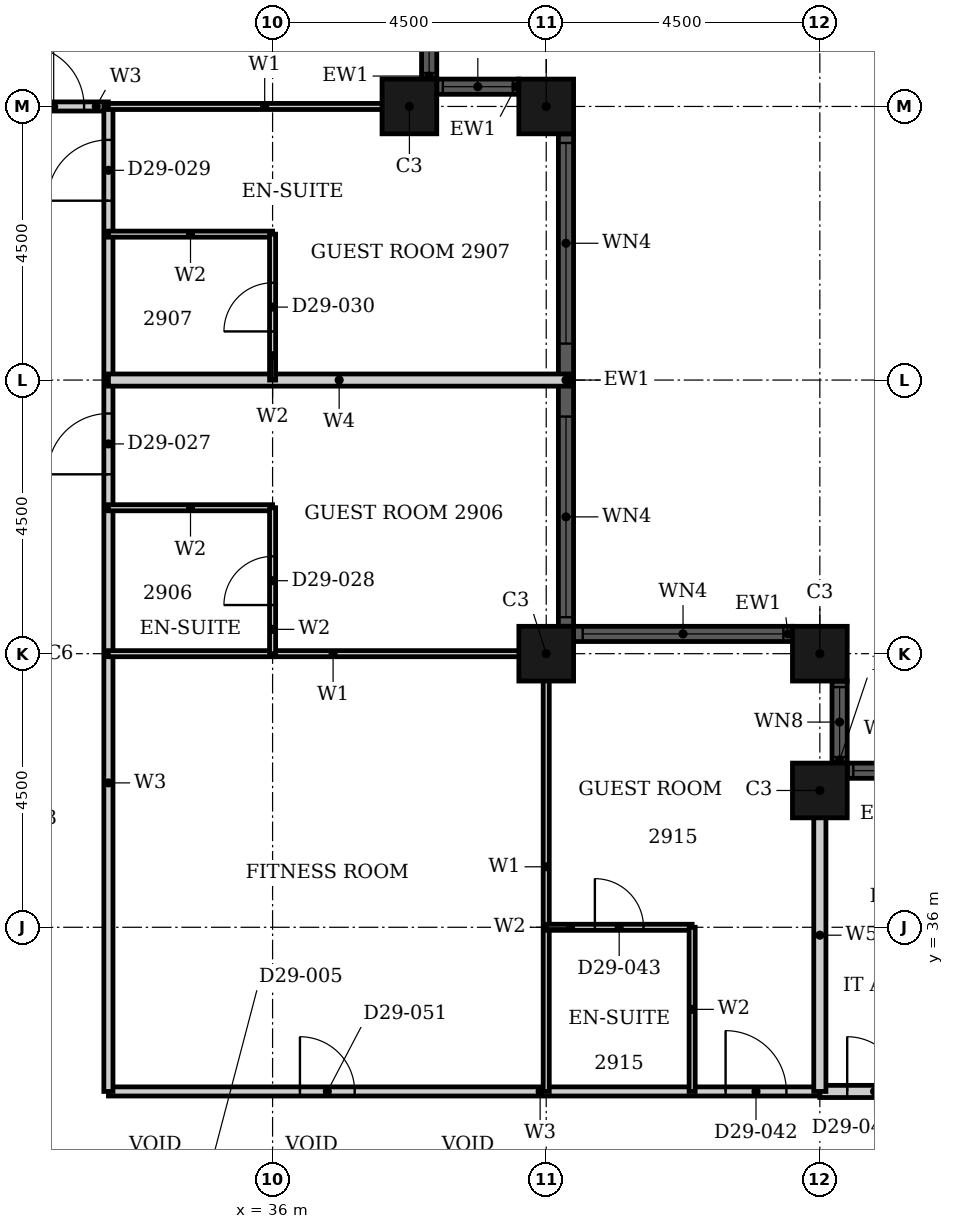
"""IFC4 building model, lengths in metres.
Left out: names, types, materials, properties, quantities, classifications, styles, units other than length and angle.
Written with IfcOpenShell. Run it as: python <this file> out.ifc"""

import sys

from ifc_helpers import new_model, si_unit, direction, frame, frame_2d, origin, origin_2d, place, context, subcontext, project, spatial, rectangle, hollow_rectangle, extrude, element, fill, save


model = new_model("IFC4")
c1 = context("Model", 3, precision=1e-05, world=origin(), true_north=direction((0.0, 1.0)))
c2 = subcontext(c1, "Body", "Model", "MODEL_VIEW")
j1 = project(units=[si_unit("LENGTHUNIT", "METRE"), si_unit("PLANEANGLEUNIT", "RADIAN")], contexts=[c1])
p1 = place(None, origin())
s1 = spatial("IfcSite", under=j1, at=p1, CompositionType="ELEMENT")
p2 = place(p1, origin())
s2 = spatial("IfcBuilding", under=s1, at=p2, CompositionType="ELEMENT")
p3 = place(p2, frame((0.0, 0.0, 118.8)))
s3 = spatial("IfcBuildingStorey", under=s2, at=p3, CompositionType="ELEMENT", Elevation=118.8)
for number, where, z_axis, x_axis in (
    (1, (45.0, 38.25, 0.0), (0.0, 0.0, 1.0), (1.0, 0.0, 0.0)),
    (2, (45.0, 40.5, 0.0), (0.0, 0.0, 1.0), (1.0, 0.0, 0.0)),
    (3, (40.5, 40.5, 0.0), (0.0, 0.0, 1.0), (1.0, 0.0, 0.0)),
    (4, (40.5, 49.5, 0.0), (0.0, 0.0, 1.0), (1.0, 0.0, 0.0)),
    (5, (38.25, 49.5, 0.0), (0.0, 0.0, 1.0), (1.0, 0.0, 0.0)),
):
    element("IfcColumn", number, at=place(p3, frame(where, z_axis=z_axis, x_axis=x_axis)), inside=s3, PredefinedType="COLUMN", context=c2, shape_type="SweptSolid", body=[
        extrude(hollow_rectangle(XDim=0.9, YDim=0.9, WallThickness=0.028, at=origin_2d()), origin(), (0.0, 0.0, 1.0), 3.6),
    ])
p4 = place(p3, frame((46.8, 38.575, 0.0), z_axis=(0.0, 0.0, 1.0), x_axis=(-1.0, 0.0, 0.0)))
e6 = element("IfcWall", 6, at=p4, inside=s3, PredefinedType="SOLIDWALL", context=c2, shape_type="SweptSolid", body=[
    extrude(rectangle(XDim=1.35, YDim=0.25, at=frame_2d((0.675, 0.0))), origin(), (0.0, 0.0, 1.0), 3.6),
])
p5 = place(p4, frame((0.1, 0.0, 0.9)))
e7 = element("IfcOpeningElement", 7, at=p5, cuts=e6, PredefinedType="OPENING", context=c2, shape_type="SweptSolid", body=[
    extrude(rectangle(XDim=1.15, YDim=2.08, at=frame_2d((0.575, 1.04))), frame((0.0, 0.135, 0.0), z_axis=(0.0, -1.0, 0.0), x_axis=(1.0, 0.0, 0.0)), (0.0, 0.0, 1.0), 0.27),
])
p6 = place(p3, frame((45.325, 38.7, 0.0), z_axis=(0.0, 0.0, 1.0), x_axis=(0.0, 1.0, 0.0)))
e8 = element("IfcWall", 8, at=p6, inside=s3, PredefinedType="SOLIDWALL", context=c2, shape_type="SweptSolid", body=[
    extrude(rectangle(XDim=1.35, YDim=0.25, at=frame_2d((0.675, 0.0))), origin(), (0.0, 0.0, 1.0), 3.6),
])
p7 = place(p6, frame((0.1, 0.0, 0.9)))
e9 = element("IfcOpeningElement", 9, at=p7, cuts=e8, PredefinedType="OPENING", context=c2, shape_type="SweptSolid", body=[
    extrude(rectangle(XDim=1.15, YDim=2.08, at=frame_2d((0.575, 1.04))), frame((0.0, 0.135, 0.0), z_axis=(0.0, -1.0, 0.0), x_axis=(1.0, 0.0, 0.0)), (0.0, 0.0, 1.0), 0.27),
])
p8 = place(p3, frame((44.55, 40.825, 0.0), z_axis=(0.0, 0.0, 1.0), x_axis=(-1.0, 0.0, 0.0)))
e10 = element("IfcWall", 10, at=p8, inside=s3, PredefinedType="SOLIDWALL", context=c2, shape_type="SweptSolid", body=[
    extrude(rectangle(XDim=3.6, YDim=0.25, at=frame_2d((1.8, 0.0))), origin(), (0.0, 0.0, 1.0), 3.6),
])
p9 = place(p8, frame((0.15, 0.0, 0.9)))
e11 = element("IfcOpeningElement", 11, at=p9, cuts=e10, PredefinedType="OPENING", context=c2, shape_type="SweptSolid", body=[
    extrude(rectangle(XDim=3.3, YDim=2.08, at=frame_2d((1.65, 1.04))), frame((0.0, 0.135, 0.0), z_axis=(0.0, -1.0, 0.0), x_axis=(1.0, 0.0, 0.0)), (0.0, 0.0, 1.0), 0.27),
])
p10 = place(p3, frame((40.825, 40.95, 0.0), z_axis=(0.0, 0.0, 1.0), x_axis=(0.0, 1.0, 0.0)))
e12 = element("IfcWall", 12, at=p10, inside=s3, PredefinedType="SOLIDWALL", context=c2, shape_type="SweptSolid", body=[
    extrude(rectangle(XDim=8.1, YDim=0.25, at=frame_2d((4.05, 0.0))), origin(), (0.0, 0.0, 1.0), 3.6),
])
p11 = place(p10, frame((0.15, 0.0, 0.9)))
e13 = element("IfcOpeningElement", 13, at=p11, cuts=e12, PredefinedType="OPENING", context=c2, shape_type="SweptSolid", body=[
    extrude(rectangle(XDim=3.3, YDim=2.08, at=frame_2d((1.65, 1.04))), frame((0.0, 0.135, 0.0), z_axis=(0.0, -1.0, 0.0), x_axis=(1.0, 0.0, 0.0)), (0.0, 0.0, 1.0), 0.27),
])
p12 = place(p10, frame((4.65, 0.0, 0.9)))
e14 = element("IfcOpeningElement", 14, at=p12, cuts=e12, PredefinedType="OPENING", context=c2, shape_type="SweptSolid", body=[
    extrude(rectangle(XDim=3.3, YDim=2.08, at=frame_2d((1.65, 1.04))), frame((0.0, 0.135, 0.0), z_axis=(0.0, -1.0, 0.0), x_axis=(1.0, 0.0, 0.0)), (0.0, 0.0, 1.0), 0.27),
])
p13 = place(p3, frame((40.05, 49.825, 0.0), z_axis=(0.0, 0.0, 1.0), x_axis=(-1.0, 0.0, 0.0)))
e15 = element("IfcWall", 15, at=p13, inside=s3, PredefinedType="SOLIDWALL", context=c2, shape_type="SweptSolid", body=[
    extrude(rectangle(XDim=1.35, YDim=0.25, at=frame_2d((0.675, 0.0))), origin(), (0.0, 0.0, 1.0), 3.6),
])
p14 = place(p13, frame((0.1, 0.0, 0.9)))
e16 = element("IfcOpeningElement", 16, at=p14, cuts=e15, PredefinedType="OPENING", context=c2, shape_type="SweptSolid", body=[
    extrude(rectangle(XDim=1.15, YDim=2.08, at=frame_2d((0.575, 1.04))), frame((0.0, 0.135, 0.0), z_axis=(0.0, -1.0, 0.0), x_axis=(1.0, 0.0, 0.0)), (0.0, 0.0, 1.0), 0.27),
])
p15 = place(p3, frame((38.575, 49.95, 0.0), z_axis=(0.0, 0.0, 1.0), x_axis=(0.0, 1.0, 0.0)))
e17 = element("IfcWall", 17, at=p15, inside=s3, PredefinedType="SOLIDWALL", context=c2, shape_type="SweptSolid", body=[
    extrude(rectangle(XDim=1.35, YDim=0.25, at=frame_2d((0.675, 0.0))), origin(), (0.0, 0.0, 1.0), 3.6),
])
p16 = place(p15, frame((0.1, 0.0, 0.9)))
e18 = element("IfcOpeningElement", 18, at=p16, cuts=e17, PredefinedType="OPENING", context=c2, shape_type="SweptSolid", body=[
    extrude(rectangle(XDim=1.15, YDim=2.08, at=frame_2d((0.575, 1.04))), frame((0.0, 0.135, 0.0), z_axis=(0.0, -1.0, 0.0), x_axis=(1.0, 0.0, 0.0)), (0.0, 0.0, 1.0), 0.27),
])
p17 = place(p3, frame((33.3, 33.3, 0.0), z_axis=(0.0, 0.0, 1.0), x_axis=(1.0, 0.0, 0.0)))
e19 = element("IfcWall", 19, at=p17, inside=s3, PredefinedType="PARTITIONING", context=c2, shape_type="SweptSolid", body=[
    extrude(rectangle(XDim=11.7, YDim=0.15, at=frame_2d((5.85, 0.0))), origin(), (0.0, 0.0, 1.0), 3.3),
])
p18 = place(p17, frame((10.15, 0.0, 0.0)))
e20 = element("IfcOpeningElement", 20, at=p18, cuts=e19, PredefinedType="OPENING", context=c2, shape_type="SweptSolid", body=[
    extrude(rectangle(XDim=1.0, YDim=2.1, at=frame_2d((0.5, 1.05))), frame((0.0, 0.085, 0.0), z_axis=(0.0, -1.0, 0.0), x_axis=(1.0, 0.0, 0.0)), (0.0, 0.0, 1.0), 0.17),
])
p19 = place(p17, frame((3.15, 0.0, 0.0)))
e21 = element("IfcOpeningElement", 21, at=p19, cuts=e19, PredefinedType="OPENING", context=c2, shape_type="SweptSolid", body=[
    extrude(rectangle(XDim=0.9, YDim=2.1, at=frame_2d((0.45, 1.05))), frame((0.0, 0.085, 0.0), z_axis=(0.0, -1.0, 0.0), x_axis=(1.0, 0.0, 0.0)), (0.0, 0.0, 1.0), 0.17),
])
p20 = place(p3, frame((31.5, 49.5, 0.0), z_axis=(0.0, 0.0, 1.0), x_axis=(1.0, 0.0, 0.0)))
e22 = element("IfcWall", 22, at=p20, inside=s3, PredefinedType="PARTITIONING", context=c2, shape_type="SweptSolid", body=[
    extrude(rectangle(XDim=1.8, YDim=0.15, at=frame_2d((0.9, 0.0))), origin(), (0.0, 0.0, 1.0), 3.3),
])
p21 = place(p20, frame((0.4, 0.0, 0.0)))
e23 = element("IfcOpeningElement", 23, at=p21, cuts=e22, PredefinedType="OPENING", context=c2, shape_type="SweptSolid", body=[
    extrude(rectangle(XDim=1.0, YDim=2.1, at=frame_2d((0.5, 1.05))), frame((0.0, 0.085, 0.0), z_axis=(0.0, -1.0, 0.0), x_axis=(1.0, 0.0, 0.0)), (0.0, 0.0, 1.0), 0.17),
])
p22 = place(p3, frame((33.3, 33.3, 0.0), z_axis=(0.0, 0.0, 1.0), x_axis=(0.0, 1.0, 0.0)))
e24 = element("IfcWall", 24, at=p22, inside=s3, PredefinedType="PARTITIONING", context=c2, shape_type="SweptSolid", body=[
    extrude(rectangle(XDim=16.2, YDim=0.15, at=frame_2d((8.1, 0.0))), origin(), (0.0, 0.0, 1.0), 3.3),
])
p23 = place(p22, frame((10.15, 0.0, 0.0)))
e25 = element("IfcOpeningElement", 25, at=p23, cuts=e24, PredefinedType="OPENING", context=c2, shape_type="SweptSolid", body=[
    extrude(rectangle(XDim=1.0, YDim=2.1, at=frame_2d((0.5, 1.05))), frame((0.0, 0.085, 0.0), z_axis=(0.0, -1.0, 0.0), x_axis=(1.0, 0.0, 0.0)), (0.0, 0.0, 1.0), 0.17),
])
p24 = place(p22, frame((14.65, 0.0, 0.0)))
e26 = element("IfcOpeningElement", 26, at=p24, cuts=e24, PredefinedType="OPENING", context=c2, shape_type="SweptSolid", body=[
    extrude(rectangle(XDim=1.0, YDim=2.1, at=frame_2d((0.5, 1.05))), frame((0.0, 0.085, 0.0), z_axis=(0.0, -1.0, 0.0), x_axis=(1.0, 0.0, 0.0)), (0.0, 0.0, 1.0), 0.17),
])
p25 = place(p3, frame((33.3, 40.5, 0.0), z_axis=(0.0, 0.0, 1.0), x_axis=(1.0, 0.0, 0.0)))
e27 = element("IfcWall", 27, at=p25, inside=s3, PredefinedType="PARTITIONING", context=c2, shape_type="SweptSolid", body=[
    extrude(rectangle(XDim=7.39, YDim=0.1, at=frame_2d((3.695, 0.0))), origin(), (0.0, 0.0, 1.0), 2.38),
])
p26 = place(p3, frame((33.3, 49.5, 0.0), z_axis=(0.0, 0.0, 1.0), x_axis=(1.0, 0.0, 0.0)))
e28 = element("IfcWall", 28, at=p26, inside=s3, PredefinedType="PARTITIONING", context=c2, shape_type="SweptSolid", body=[
    extrude(rectangle(XDim=5.14, YDim=0.1, at=frame_2d((2.57, 0.0))), origin(), (0.0, 0.0, 1.0), 3.3),
])
p27 = place(p3, frame((40.5, 33.3, 0.0), z_axis=(0.0, 0.0, 1.0), x_axis=(0.0, 1.0, 0.0)))
e29 = element("IfcWall", 29, at=p27, inside=s3, PredefinedType="PARTITIONING", context=c2, shape_type="SweptSolid", body=[
    extrude(rectangle(XDim=7.39, YDim=0.1, at=frame_2d((3.695, 0.0))), origin(), (0.0, 0.0, 1.0), 3.3),
])
p28 = place(p3, frame((33.3, 45.0, 0.0), z_axis=(0.0, 0.0, 1.0), x_axis=(1.0, 0.0, 0.0)))
e30 = element("IfcWall", 30, at=p28, inside=s3, PredefinedType="PARTITIONING", context=c2, shape_type="SweptSolid", body=[
    extrude(rectangle(XDim=7.59, YDim=0.2, at=frame_2d((3.795, 0.0))), origin(), (0.0, 0.0, 1.0), 3.3),
])
p29 = place(p3, frame((40.5, 36.0, 0.0), z_axis=(0.0, 0.0, 1.0), x_axis=(1.0, 0.0, 0.0)))
e31 = element("IfcWall", 31, at=p29, inside=s3, PredefinedType="PARTITIONING", context=c2, shape_type="SweptSolid", body=[
    extrude(rectangle(XDim=2.4, YDim=0.1, at=frame_2d((1.2, 0.0))), origin(), (0.0, 0.0, 1.0), 3.3),
])
p30 = place(p29, frame((0.8, 0.0, 0.0)))
e32 = element("IfcOpeningElement", 32, at=p30, cuts=e31, PredefinedType="OPENING", context=c2, shape_type="SweptSolid", body=[
    extrude(rectangle(XDim=0.8, YDim=2.1, at=frame_2d((0.4, 1.05))), frame((0.0, 0.06, 0.0), z_axis=(0.0, -1.0, 0.0), x_axis=(1.0, 0.0, 0.0)), (0.0, 0.0, 1.0), 0.12),
])
for number, where, z_axis, x_axis in (
    (33, (33.3, 42.9, 0.0), (0.0, 0.0, 1.0), (1.0, 0.0, 0.0)),
    (34, (33.3, 47.4, 0.0), (0.0, 0.0, 1.0), (1.0, 0.0, 0.0)),
):
    element("IfcWall", number, at=place(p3, frame(where, z_axis=z_axis, x_axis=x_axis)), inside=s3, PredefinedType="PARTITIONING", context=c2, shape_type="SweptSolid", body=[
        extrude(rectangle(XDim=2.7, YDim=0.1, at=frame_2d((1.35, 0.0))), origin(), (0.0, 0.0, 1.0), 3.3),
    ])
p31 = place(p3, frame((36.0, 40.5, 0.0), z_axis=(0.0, 0.0, 1.0), x_axis=(0.0, 1.0, 0.0)))
e35 = element("IfcWall", 35, at=p31, inside=s3, PredefinedType="PARTITIONING", context=c2, shape_type="SweptSolid", body=[
    extrude(rectangle(XDim=2.4, YDim=0.1, at=frame_2d((1.2, 0.0))), origin(), (0.0, 0.0, 1.0), 2.58),
])
p32 = place(p31, frame((0.8, 0.0, 0.0)))
e36 = element("IfcOpeningElement", 36, at=p32, cuts=e35, PredefinedType="OPENING", context=c2, shape_type="SweptSolid", body=[
    extrude(rectangle(XDim=0.8, YDim=2.1, at=frame_2d((0.4, 1.05))), frame((0.0, 0.06, 0.0), z_axis=(0.0, -1.0, 0.0), x_axis=(1.0, 0.0, 0.0)), (0.0, 0.0, 1.0), 0.12),
])
p33 = place(p3, frame((36.0, 45.0, 0.0), z_axis=(0.0, 0.0, 1.0), x_axis=(0.0, 1.0, 0.0)))
e37 = element("IfcWall", 37, at=p33, inside=s3, PredefinedType="PARTITIONING", context=c2, shape_type="SweptSolid", body=[
    extrude(rectangle(XDim=2.4, YDim=0.1, at=frame_2d((1.2, 0.0))), origin(), (0.0, 0.0, 1.0), 2.58),
])
p34 = place(p33, frame((0.8, 0.0, 0.0)))
e38 = element("IfcOpeningElement", 38, at=p34, cuts=e37, PredefinedType="OPENING", context=c2, shape_type="SweptSolid", body=[
    extrude(rectangle(XDim=0.8, YDim=2.1, at=frame_2d((0.4, 1.05))), frame((0.0, 0.06, 0.0), z_axis=(0.0, -1.0, 0.0), x_axis=(1.0, 0.0, 0.0)), (0.0, 0.0, 1.0), 0.12),
])
p35 = place(p3, frame((42.9, 33.3, 0.0), z_axis=(0.0, 0.0, 1.0), x_axis=(0.0, 1.0, 0.0)))
e39 = element("IfcWall", 39, at=p35, inside=s3, PredefinedType="PARTITIONING", context=c2, shape_type="SweptSolid", body=[
    extrude(rectangle(XDim=2.7, YDim=0.1, at=frame_2d((1.35, 0.0))), origin(), (0.0, 0.0, 1.0), 3.3),
])
p36 = place(p3, frame((45.0, 33.3, 0.0), z_axis=(0.0, 0.0, 1.0), x_axis=(1.0, 0.0, 0.0)))
e40 = element("IfcWall", 40, at=p36, inside=s3, PredefinedType="PARTITIONING", context=c2, shape_type="SweptSolid", body=[
    extrude(rectangle(XDim=4.5, YDim=0.2, at=frame_2d((2.25, 0.0))), origin(), (0.0, 0.0, 1.0), 3.3),
])
p37 = place(p36, frame((0.45, 0.0, 0.0)))
e41 = element("IfcOpeningElement", 41, at=p37, cuts=e40, PredefinedType="OPENING", context=c2, shape_type="SweptSolid", body=[
    extrude(rectangle(XDim=0.9, YDim=2.1, at=frame_2d((0.45, 1.05))), frame((0.0, 0.11, 0.0), z_axis=(0.0, -1.0, 0.0), x_axis=(1.0, 0.0, 0.0)), (0.0, 0.0, 1.0), 0.22),
])
p38 = place(p3, frame((45.0, 33.3, 0.0), z_axis=(0.0, 0.0, 1.0), x_axis=(0.0, 1.0, 0.0)))
e42 = element("IfcWall", 42, at=p38, inside=s3, PredefinedType="PARTITIONING", context=c2, shape_type="SweptSolid", body=[
    extrude(rectangle(XDim=5.14, YDim=0.2, at=frame_2d((2.57, 0.0))), origin(), (0.0, 0.0, 1.0), 3.3),
])
p39 = place(p5, origin())
e43 = element("IfcWindow", 43, at=p39, inside=s3, PartitioningType="SINGLE_PANEL", PredefinedType="WINDOW", context=c2, shape_type="SweptSolid", body=[
    extrude(rectangle(XDim=1.15, YDim=2.08, at=frame_2d((0.575, 1.04))), frame((0.0, 0.03, 0.0), z_axis=(0.0, -1.0, 0.0), x_axis=(1.0, 0.0, 0.0)), (0.0, 0.0, 1.0), 0.06),
])
fill(e7, e43)
p40 = place(p7, origin())
e44 = element("IfcWindow", 44, at=p40, inside=s3, PartitioningType="SINGLE_PANEL", PredefinedType="WINDOW", context=c2, shape_type="SweptSolid", body=[
    extrude(rectangle(XDim=1.15, YDim=2.08, at=frame_2d((0.575, 1.04))), frame((0.0, 0.03, 0.0), z_axis=(0.0, -1.0, 0.0), x_axis=(1.0, 0.0, 0.0)), (0.0, 0.0, 1.0), 0.06),
])
fill(e9, e44)
p41 = place(p9, origin())
e45 = element("IfcWindow", 45, at=p41, inside=s3, PartitioningType="SINGLE_PANEL", PredefinedType="WINDOW", context=c2, shape_type="SweptSolid", body=[
    extrude(rectangle(XDim=3.3, YDim=2.08, at=frame_2d((1.65, 1.04))), frame((0.0, 0.03, 0.0), z_axis=(0.0, -1.0, 0.0), x_axis=(1.0, 0.0, 0.0)), (0.0, 0.0, 1.0), 0.06),
])
fill(e11, e45)
p42 = place(p11, origin())
e46 = element("IfcWindow", 46, at=p42, inside=s3, PartitioningType="SINGLE_PANEL", PredefinedType="WINDOW", context=c2, shape_type="SweptSolid", body=[
    extrude(rectangle(XDim=3.3, YDim=2.08, at=frame_2d((1.65, 1.04))), frame((0.0, 0.03, 0.0), z_axis=(0.0, -1.0, 0.0), x_axis=(1.0, 0.0, 0.0)), (0.0, 0.0, 1.0), 0.06),
])
fill(e13, e46)
p43 = place(p12, origin())
e47 = element("IfcWindow", 47, at=p43, inside=s3, PartitioningType="SINGLE_PANEL", PredefinedType="WINDOW", context=c2, shape_type="SweptSolid", body=[
    extrude(rectangle(XDim=3.3, YDim=2.08, at=frame_2d((1.65, 1.04))), frame((0.0, 0.03, 0.0), z_axis=(0.0, -1.0, 0.0), x_axis=(1.0, 0.0, 0.0)), (0.0, 0.0, 1.0), 0.06),
])
fill(e14, e47)
p44 = place(p14, origin())
e48 = element("IfcWindow", 48, at=p44, inside=s3, PartitioningType="SINGLE_PANEL", PredefinedType="WINDOW", context=c2, shape_type="SweptSolid", body=[
    extrude(rectangle(XDim=1.15, YDim=2.08, at=frame_2d((0.575, 1.04))), frame((0.0, 0.03, 0.0), z_axis=(0.0, -1.0, 0.0), x_axis=(1.0, 0.0, 0.0)), (0.0, 0.0, 1.0), 0.06),
])
fill(e16, e48)
p45 = place(p16, origin())
e49 = element("IfcWindow", 49, at=p45, inside=s3, PartitioningType="SINGLE_PANEL", PredefinedType="WINDOW", context=c2, shape_type="SweptSolid", body=[
    extrude(rectangle(XDim=1.15, YDim=2.08, at=frame_2d((0.575, 1.04))), frame((0.0, 0.03, 0.0), z_axis=(0.0, -1.0, 0.0), x_axis=(1.0, 0.0, 0.0)), (0.0, 0.0, 1.0), 0.06),
])
fill(e18, e49)
p46 = place(p23, origin())
e50 = element("IfcDoor", 50, at=p46, inside=s3, OperationType="SINGLE_SWING_RIGHT", PredefinedType="DOOR", context=c2, shape_type="SweptSolid", body=[
    extrude(rectangle(XDim=1.0, YDim=2.1, at=frame_2d((0.5, 1.05))), frame((0.0, 0.025, 0.0), z_axis=(0.0, -1.0, 0.0), x_axis=(1.0, 0.0, 0.0)), (0.0, 0.0, 1.0), 0.05),
])
fill(e25, e50)
p47 = place(p32, origin())
e51 = element("IfcDoor", 51, at=p47, inside=s3, OperationType="SINGLE_SWING_LEFT", PredefinedType="DOOR", context=c2, shape_type="SweptSolid", body=[
    extrude(rectangle(XDim=0.8, YDim=2.1, at=frame_2d((0.4, 1.05))), frame((0.0, 0.025, 0.0), z_axis=(0.0, -1.0, 0.0), x_axis=(1.0, 0.0, 0.0)), (0.0, 0.0, 1.0), 0.05),
])
fill(e36, e51)
p48 = place(p24, origin())
e52 = element("IfcDoor", 52, at=p48, inside=s3, OperationType="SINGLE_SWING_RIGHT", PredefinedType="DOOR", context=c2, shape_type="SweptSolid", body=[
    extrude(rectangle(XDim=1.0, YDim=2.1, at=frame_2d((0.5, 1.05))), frame((0.0, 0.025, 0.0), z_axis=(0.0, -1.0, 0.0), x_axis=(1.0, 0.0, 0.0)), (0.0, 0.0, 1.0), 0.05),
])
fill(e26, e52)
p49 = place(p34, origin())
e53 = element("IfcDoor", 53, at=p49, inside=s3, OperationType="SINGLE_SWING_RIGHT", PredefinedType="DOOR", context=c2, shape_type="SweptSolid", body=[
    extrude(rectangle(XDim=0.8, YDim=2.1, at=frame_2d((0.4, 1.05))), frame((0.0, 0.025, 0.0), z_axis=(0.0, -1.0, 0.0), x_axis=(1.0, 0.0, 0.0)), (0.0, 0.0, 1.0), 0.05),
])
fill(e38, e53)
p50 = place(p21, origin())
e54 = element("IfcDoor", 54, at=p50, inside=s3, OperationType="SINGLE_SWING_LEFT", PredefinedType="DOOR", context=c2, shape_type="SweptSolid", body=[
    extrude(rectangle(XDim=1.0, YDim=2.1, at=frame_2d((0.5, 1.05))), frame((0.0, 0.025, 0.0), z_axis=(0.0, -1.0, 0.0), x_axis=(1.0, 0.0, 0.0)), (0.0, 0.0, 1.0), 0.05),
])
fill(e23, e54)
p51 = place(p18, origin())
e55 = element("IfcDoor", 55, at=p51, inside=s3, OperationType="SINGLE_SWING_RIGHT", PredefinedType="DOOR", context=c2, shape_type="SweptSolid", body=[
    extrude(rectangle(XDim=1.0, YDim=2.1, at=frame_2d((0.5, 1.05))), frame((0.0, 0.025, 0.0), z_axis=(0.0, -1.0, 0.0), x_axis=(1.0, 0.0, 0.0)), (0.0, 0.0, 1.0), 0.05),
])
fill(e20, e55)
p52 = place(p30, origin())
e56 = element("IfcDoor", 56, at=p52, inside=s3, OperationType="SINGLE_SWING_LEFT", PredefinedType="DOOR", context=c2, shape_type="SweptSolid", body=[
    extrude(rectangle(XDim=0.8, YDim=2.1, at=frame_2d((0.4, 1.05))), frame((0.0, 0.025, 0.0), z_axis=(0.0, -1.0, 0.0), x_axis=(1.0, 0.0, 0.0)), (0.0, 0.0, 1.0), 0.05),
])
fill(e32, e56)
p53 = place(p37, origin())
e57 = element("IfcDoor", 57, at=p53, inside=s3, OperationType="SINGLE_SWING_RIGHT", PredefinedType="DOOR", context=c2, shape_type="SweptSolid", body=[
    extrude(rectangle(XDim=0.9, YDim=2.1, at=frame_2d((0.45, 1.05))), frame((0.0, 0.025, 0.0), z_axis=(0.0, -1.0, 0.0), x_axis=(1.0, 0.0, 0.0)), (0.0, 0.0, 1.0), 0.05),
])
fill(e41, e57)
p54 = place(p19, origin())
e58 = element("IfcDoor", 58, at=p54, inside=s3, OperationType="SINGLE_SWING_RIGHT", PredefinedType="DOOR", context=c2, shape_type="SweptSolid", body=[
    extrude(rectangle(XDim=0.9, YDim=2.1, at=frame_2d((0.45, 1.05))), frame((0.0, 0.025, 0.0), z_axis=(0.0, -1.0, 0.0), x_axis=(1.0, 0.0, 0.0)), (0.0, 0.0, 1.0), 0.05),
])
fill(e21, e58)
save(model, sys.argv[1])
